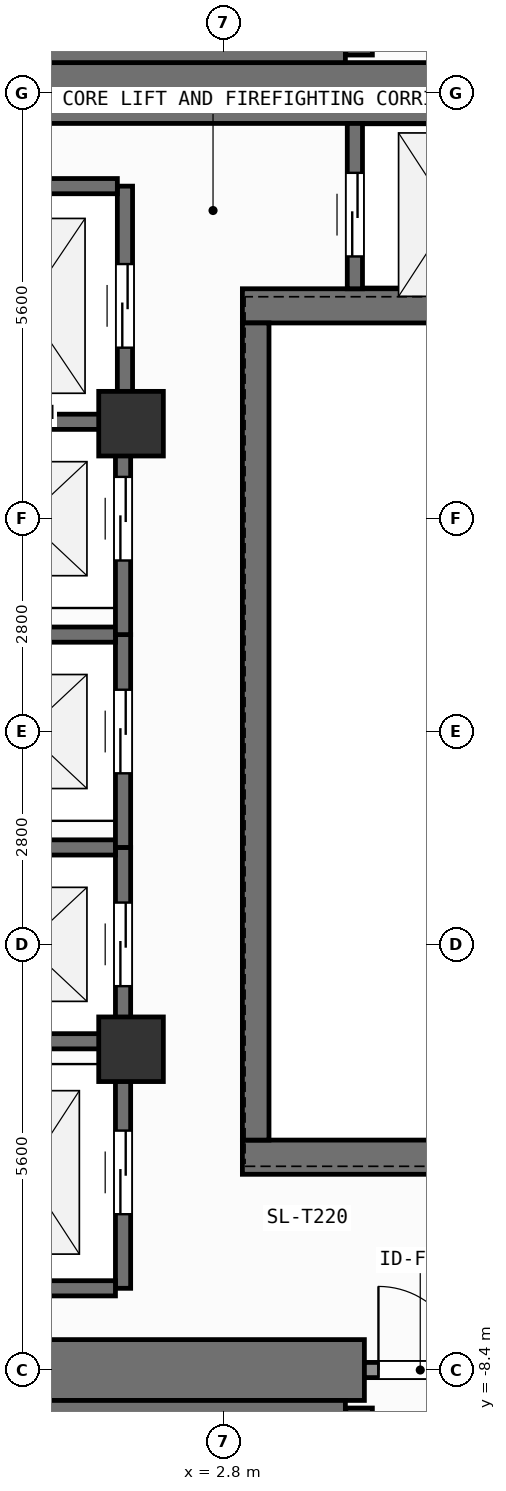
"""IFC4 building model, lengths in metres.
Left out: names, types, materials, properties, quantities, classifications, styles, units other than length and angle.
Written with IfcOpenShell. Run it as: python <this file> out.ifc"""

import sys

from ifc_helpers import new_model, si_unit, direction, frame, frame_2d, origin, origin_2d, place, context, subcontext, project, spatial, rectangle, extrude, element, fill, save


model = new_model("IFC4")
c1 = context("Model", 3, precision=1e-05, world=origin(), true_north=direction((0.0, 1.0)))
c2 = subcontext(c1, "Body", "Model", "MODEL_VIEW")
j1 = project(units=[si_unit("LENGTHUNIT", "METRE"), si_unit("PLANEANGLEUNIT", "RADIAN")], contexts=[c1])
p1 = place(None, origin())
s1 = spatial("IfcSite", under=j1, at=p1, CompositionType="ELEMENT")
p2 = place(p1, origin())
s2 = spatial("IfcBuilding", under=s1, at=p2, CompositionType="ELEMENT")
p3 = place(p2, frame((0.0, 0.0, 227.4)))
s3 = spatial("IfcBuildingStorey", under=s2, at=p3, CompositionType="ELEMENT", Elevation=227.4)
p4 = place(p3, frame((-2.62, -8.4, 0.0), z_axis=(0.0, 0.0, 1.0), x_axis=(1.0, 0.0, 0.0)))
e1 = element("IfcWall", 1, at=p4, inside=s3, PredefinedType="SHEAR", context=c2, shape_type="SweptSolid", body=[
    extrude(rectangle(XDim=7.27, YDim=0.8, at=frame_2d((3.635, 0.0))), origin(), (0.0, 0.0, 1.0), 3.9),
])
p5 = place(p3, frame((-7.55, 8.4, 0.0), z_axis=(0.0, 0.0, 1.0), x_axis=(1.0, 0.0, 0.0)))
e2 = element("IfcWall", 2, at=p5, inside=s3, PredefinedType="SHEAR", context=c2, shape_type="SweptSolid", body=[
    extrude(rectangle(XDim=16.35, YDim=0.8, at=frame_2d((8.175, 0.0))), origin(), (0.0, 0.0, 1.0), 3.9),
])
for number, where, z_axis, x_axis in (
    (3, (3.045, -5.6, 0.0), (0.0, 0.0, 1.0), (1.0, 0.0, 0.0)),
    (4, (3.045, 5.6, 0.0), (0.0, 0.0, 1.0), (1.0, 0.0, 0.0)),
):
    element("IfcWall", number, at=place(p3, frame(where, z_axis=z_axis, x_axis=x_axis)), inside=s3, PredefinedType="SHEAR", context=c2, shape_type="SweptSolid", body=[
        extrude(rectangle(XDim=5.755, YDim=0.45, at=frame_2d((2.877, 0.0))), origin(), (0.0, 0.0, 1.0), 3.9),
    ])
p6 = place(p3, frame((3.22, -5.375, 0.0), z_axis=(0.0, 0.0, 1.0), x_axis=(0.0, 1.0, 0.0)))
e5 = element("IfcWall", 5, at=p6, inside=s3, PredefinedType="SHEAR", context=c2, shape_type="SweptSolid", body=[
    extrude(rectangle(XDim=10.75, YDim=0.35, at=frame_2d((5.375, 0.0))), origin(), (0.0, 0.0, 1.0), 3.9),
])
p7 = place(p3, frame((-2.2, -8.913, 0.0), z_axis=(0.0, 0.0, 1.0), x_axis=(1.0, 0.0, 0.0)))
e6 = element("IfcWall", 6, at=p7, inside=s3, PredefinedType="SHEAR", context=c2, shape_type="SweptSolid", body=[
    extrude(rectangle(XDim=6.6, YDim=0.225, at=frame_2d((3.3, 0.0))), origin(), (0.0, 0.0, 1.0), 3.9),
])
p8 = place(p3, frame((4.58, -8.9, 0.0), z_axis=(0.0, 0.0, 1.0), x_axis=(0.0, -1.0, 0.0)))
e7 = element("IfcWall", 7, at=p8, inside=s3, PredefinedType="SHEAR", context=c2, shape_type="SweptSolid", body=[
    extrude(rectangle(XDim=2.925, YDim=0.35, at=frame_2d((1.462, 0.0))), origin(), (0.0, 0.0, 1.0), 3.9),
])
p9 = place(p8, frame((0.913, 0.0, 0.0)))
e8 = element("IfcOpeningElement", 8, at=p9, cuts=e7, PredefinedType="OPENING", context=c2, shape_type="SweptSolid", body=[
    extrude(rectangle(XDim=1.1, YDim=2.15, at=frame_2d((0.55, 1.075))), frame((0.0, 0.185, 0.0), z_axis=(0.0, -1.0, 0.0), x_axis=(1.0, 0.0, 0.0)), (0.0, 0.0, 1.0), 0.37),
])
p10 = place(p3, frame((-2.2, 8.913, 0.0), z_axis=(0.0, 0.0, 1.0), x_axis=(1.0, 0.0, 0.0)))
e9 = element("IfcWall", 9, at=p10, inside=s3, PredefinedType="SHEAR", context=c2, shape_type="SweptSolid", body=[
    extrude(rectangle(XDim=6.6, YDim=0.225, at=frame_2d((3.3, 0.0))), origin(), (0.0, 0.0, 1.0), 3.9),
])
p11 = place(p3, frame((4.58, 11.825, 0.0), z_axis=(0.0, 0.0, 1.0), x_axis=(0.0, -1.0, 0.0)))
e10 = element("IfcWall", 10, at=p11, inside=s3, PredefinedType="SHEAR", context=c2, shape_type="SweptSolid", body=[
    extrude(rectangle(XDim=2.925, YDim=0.35, at=frame_2d((1.462, 0.0))), origin(), (0.0, 0.0, 1.0), 3.9),
])
p12 = place(p11, frame((0.913, 0.0, 0.0)))
e11 = element("IfcOpeningElement", 11, at=p12, cuts=e10, PredefinedType="OPENING", context=c2, shape_type="SweptSolid", body=[
    extrude(rectangle(XDim=1.1, YDim=2.15, at=frame_2d((0.55, 1.075))), frame((0.0, 0.185, 0.0), z_axis=(0.0, -1.0, 0.0), x_axis=(1.0, 0.0, 0.0)), (0.0, 0.0, 1.0), 0.37),
])
for number, where, z_axis, x_axis in (
    (12, (1.58, -4.18, 0.0), (0.0, 0.0, 1.0), (1.0, 0.0, 0.0)),
    (13, (1.58, 4.05, 0.0), (0.0, 0.0, 1.0), (1.0, 0.0, 0.0)),
):
    element("IfcColumn", number, at=place(p3, frame(where, z_axis=z_axis, x_axis=x_axis)), inside=s3, PredefinedType="COLUMN", context=c2, shape_type="SweptSolid", body=[
        extrude(rectangle(XDim=0.85, YDim=0.85, at=origin_2d()), origin(), (0.0, 0.0, 1.0), 3.9),
    ])
p13 = place(p3, frame((1.475, -4.275, 0.0), z_axis=(0.0, 0.0, 1.0), x_axis=(0.0, 1.0, 0.0)))
e14 = element("IfcWall", 14, at=p13, inside=s3, PredefinedType="SHEAR", context=c2, shape_type="SweptSolid", body=[
    extrude(rectangle(XDim=2.75, YDim=0.2, at=frame_2d((1.375, 0.0))), origin(), (0.0, 0.0, 1.0), 3.68),
])
p14 = place(p13, frame((0.925, 0.0, 0.0)))
e15 = element("IfcOpeningElement", 15, at=p14, cuts=e14, PredefinedType="OPENING", context=c2, shape_type="SweptSolid", body=[
    extrude(rectangle(XDim=1.1, YDim=2.2, at=frame_2d((0.55, 1.1))), frame((0.0, 0.11, 0.0), z_axis=(0.0, -1.0, 0.0), x_axis=(1.0, 0.0, 0.0)), (0.0, 0.0, 1.0), 0.22),
])
for number, where, z_axis, x_axis in (
    (16, (-0.975, -4.075, 0.0), (0.0, 0.0, 1.0), (1.0, 0.0, 0.0)),
    (17, (-0.975, -1.525, 0.0), (0.0, 0.0, 1.0), (1.0, 0.0, 0.0)),
):
    element("IfcWall", number, at=place(p3, frame(where, z_axis=z_axis, x_axis=x_axis)), inside=s3, PredefinedType="SHEAR", context=c2, shape_type="SweptSolid", body=[
        extrude(rectangle(XDim=2.35, YDim=0.2, at=frame_2d((1.175, 0.0))), origin(), (0.0, 0.0, 1.0), 3.68),
    ])
p15 = place(p3, frame((1.475, -1.525, 0.0), z_axis=(0.0, 0.0, 1.0), x_axis=(0.0, 1.0, 0.0)))
e18 = element("IfcWall", 18, at=p15, inside=s3, PredefinedType="SHEAR", context=c2, shape_type="SweptSolid", body=[
    extrude(rectangle(XDim=2.8, YDim=0.2, at=frame_2d((1.4, 0.0))), origin(), (0.0, 0.0, 1.0), 3.68),
])
p16 = place(p15, frame((0.975, 0.0, 0.0)))
e19 = element("IfcOpeningElement", 19, at=p16, cuts=e18, PredefinedType="OPENING", context=c2, shape_type="SweptSolid", body=[
    extrude(rectangle(XDim=1.1, YDim=2.2, at=frame_2d((0.55, 1.1))), frame((0.0, 0.11, 0.0), z_axis=(0.0, -1.0, 0.0), x_axis=(1.0, 0.0, 0.0)), (0.0, 0.0, 1.0), 0.22),
])
p17 = place(p3, frame((-0.975, 1.275, 0.0), z_axis=(0.0, 0.0, 1.0), x_axis=(1.0, 0.0, 0.0)))
e20 = element("IfcWall", 20, at=p17, inside=s3, PredefinedType="SHEAR", context=c2, shape_type="SweptSolid", body=[
    extrude(rectangle(XDim=2.35, YDim=0.2, at=frame_2d((1.175, 0.0))), origin(), (0.0, 0.0, 1.0), 3.68),
])
p18 = place(p3, frame((1.475, 1.275, 0.0), z_axis=(0.0, 0.0, 1.0), x_axis=(0.0, 1.0, 0.0)))
e21 = element("IfcWall", 21, at=p18, inside=s3, PredefinedType="SHEAR", context=c2, shape_type="SweptSolid", body=[
    extrude(rectangle(XDim=2.8, YDim=0.2, at=frame_2d((1.4, 0.0))), origin(), (0.0, 0.0, 1.0), 3.68),
])
p19 = place(p18, frame((0.975, 0.0, 0.0)))
e22 = element("IfcOpeningElement", 22, at=p19, cuts=e21, PredefinedType="OPENING", context=c2, shape_type="SweptSolid", body=[
    extrude(rectangle(XDim=1.1, YDim=2.2, at=frame_2d((0.55, 1.1))), frame((0.0, 0.11, 0.0), z_axis=(0.0, -1.0, 0.0), x_axis=(1.0, 0.0, 0.0)), (0.0, 0.0, 1.0), 0.22),
])
p20 = place(p3, frame((-0.975, 4.075, 0.0), z_axis=(0.0, 0.0, 1.0), x_axis=(1.0, 0.0, 0.0)))
e23 = element("IfcWall", 23, at=p20, inside=s3, PredefinedType="SHEAR", context=c2, shape_type="SweptSolid", body=[
    extrude(rectangle(XDim=2.35, YDim=0.2, at=frame_2d((1.175, 0.0))), origin(), (0.0, 0.0, 1.0), 3.68),
])
p21 = place(p3, frame((1.5, 4.025, 0.0), z_axis=(0.0, 0.0, 1.0), x_axis=(0.0, 1.0, 0.0)))
e24 = element("IfcWall", 24, at=p21, inside=s3, PredefinedType="SHEAR", context=c2, shape_type="SweptSolid", body=[
    extrude(rectangle(XDim=3.15, YDim=0.2, at=frame_2d((1.575, 0.0))), origin(), (0.0, 0.0, 1.0), 3.68),
])
p22 = place(p21, frame((1.025, 0.0, 0.0)))
e25 = element("IfcOpeningElement", 25, at=p22, cuts=e24, PredefinedType="OPENING", context=c2, shape_type="SweptSolid", body=[
    extrude(rectangle(XDim=1.1, YDim=2.2, at=frame_2d((0.55, 1.1))), frame((0.0, 0.11, 0.0), z_axis=(0.0, -1.0, 0.0), x_axis=(1.0, 0.0, 0.0)), (0.0, 0.0, 1.0), 0.22),
])
p23 = place(p3, frame((-1.0, 7.175, 0.0), z_axis=(0.0, 0.0, 1.0), x_axis=(1.0, 0.0, 0.0)))
e26 = element("IfcWall", 26, at=p23, inside=s3, PredefinedType="SHEAR", context=c2, shape_type="SweptSolid", body=[
    extrude(rectangle(XDim=2.4, YDim=0.2, at=frame_2d((1.2, 0.0))), origin(), (0.0, 0.0, 1.0), 3.68),
])
p24 = place(p3, frame((1.475, -7.325, 0.0), z_axis=(0.0, 0.0, 1.0), x_axis=(0.0, 1.0, 0.0)))
e27 = element("IfcWall", 27, at=p24, inside=s3, PredefinedType="SHEAR", context=c2, shape_type="SweptSolid", body=[
    extrude(rectangle(XDim=3.05, YDim=0.2, at=frame_2d((1.525, 0.0))), origin(), (0.0, 0.0, 1.0), 3.68),
])
p25 = place(p24, frame((0.975, 0.0, 0.0)))
e28 = element("IfcOpeningElement", 28, at=p25, cuts=e27, PredefinedType="OPENING", context=c2, shape_type="SweptSolid", body=[
    extrude(rectangle(XDim=1.1, YDim=2.2, at=frame_2d((0.55, 1.1))), frame((0.0, 0.11, 0.0), z_axis=(0.0, -1.0, 0.0), x_axis=(1.0, 0.0, 0.0)), (0.0, 0.0, 1.0), 0.22),
])
p26 = place(p3, frame((-0.975, -7.325, 0.0), z_axis=(0.0, 0.0, 1.0), x_axis=(1.0, 0.0, 0.0)))
e29 = element("IfcWall", 29, at=p26, inside=s3, PredefinedType="SHEAR", context=c2, shape_type="SweptSolid", body=[
    extrude(rectangle(XDim=2.35, YDim=0.2, at=frame_2d((1.175, 0.0))), origin(), (0.0, 0.0, 1.0), 3.68),
])
p27 = place(p3, frame((4.525, 5.825, 0.0), z_axis=(0.0, 0.0, 1.0), x_axis=(0.0, 1.0, 0.0)))
e30 = element("IfcWall", 30, at=p27, inside=s3, PredefinedType="SHEAR", context=c2, shape_type="SweptSolid", body=[
    extrude(rectangle(XDim=2.175, YDim=0.2, at=frame_2d((1.087, 0.0))), origin(), (0.0, 0.0, 1.0), 3.68),
])
p28 = place(p27, frame((0.425, 0.0, 0.0)))
e31 = element("IfcOpeningElement", 31, at=p28, cuts=e30, PredefinedType="OPENING", context=c2, shape_type="SweptSolid", body=[
    extrude(rectangle(XDim=1.1, YDim=2.2, at=frame_2d((0.55, 1.1))), frame((0.0, 0.11, 0.0), z_axis=(0.0, -1.0, 0.0), x_axis=(1.0, 0.0, 0.0)), (0.0, 0.0, 1.0), 0.22),
])
p29 = place(p3, frame((4.65, -8.4, 0.0), z_axis=(0.0, 0.0, 1.0), x_axis=(1.0, 0.0, 0.0)))
e32 = element("IfcWall", 32, at=p29, inside=s3, PredefinedType="SOLIDWALL", context=c2, shape_type="SweptSolid", body=[
    extrude(rectangle(XDim=1.47, YDim=0.2, at=frame_2d((0.735, 0.0))), origin(), (0.0, 0.0, 1.0), 2.82),
])
p30 = place(p29, frame((0.185, 0.0, 0.0)))
e33 = element("IfcOpeningElement", 33, at=p30, cuts=e32, PredefinedType="OPENING", context=c2, shape_type="SweptSolid", body=[
    extrude(rectangle(XDim=1.1, YDim=2.15, at=frame_2d((0.55, 1.075))), frame((0.0, 0.11, 0.0), z_axis=(0.0, -1.0, 0.0), x_axis=(1.0, 0.0, 0.0)), (0.0, 0.0, 1.0), 0.22),
])
p31 = place(p14, origin())
e34 = element("IfcDoor", 34, at=p31, inside=s3, OperationType="SLIDING_TO_LEFT", PredefinedType="DOOR", context=c2, shape_type="SweptSolid", body=[
    extrude(rectangle(XDim=1.1, YDim=2.2, at=frame_2d((0.55, 1.1))), frame((0.0, 0.025, 0.0), z_axis=(0.0, -1.0, 0.0), x_axis=(1.0, 0.0, 0.0)), (0.0, 0.0, 1.0), 0.05),
])
fill(e15, e34)
p32 = place(p16, origin())
e35 = element("IfcDoor", 35, at=p32, inside=s3, OperationType="SLIDING_TO_LEFT", PredefinedType="DOOR", context=c2, shape_type="SweptSolid", body=[
    extrude(rectangle(XDim=1.1, YDim=2.2, at=frame_2d((0.55, 1.1))), frame((0.0, 0.025, 0.0), z_axis=(0.0, -1.0, 0.0), x_axis=(1.0, 0.0, 0.0)), (0.0, 0.0, 1.0), 0.05),
])
fill(e19, e35)
p33 = place(p19, origin())
e36 = element("IfcDoor", 36, at=p33, inside=s3, OperationType="SLIDING_TO_LEFT", PredefinedType="DOOR", context=c2, shape_type="SweptSolid", body=[
    extrude(rectangle(XDim=1.1, YDim=2.2, at=frame_2d((0.55, 1.1))), frame((0.0, 0.025, 0.0), z_axis=(0.0, -1.0, 0.0), x_axis=(1.0, 0.0, 0.0)), (0.0, 0.0, 1.0), 0.05),
])
fill(e22, e36)
p34 = place(p22, origin())
e37 = element("IfcDoor", 37, at=p34, inside=s3, OperationType="SLIDING_TO_LEFT", PredefinedType="DOOR", context=c2, shape_type="SweptSolid", body=[
    extrude(rectangle(XDim=1.1, YDim=2.2, at=frame_2d((0.55, 1.1))), frame((0.0, 0.025, 0.0), z_axis=(0.0, -1.0, 0.0), x_axis=(1.0, 0.0, 0.0)), (0.0, 0.0, 1.0), 0.05),
])
fill(e25, e37)
p35 = place(p25, origin())
e38 = element("IfcDoor", 38, at=p35, inside=s3, OperationType="SLIDING_TO_LEFT", PredefinedType="DOOR", context=c2, shape_type="SweptSolid", body=[
    extrude(rectangle(XDim=1.1, YDim=2.2, at=frame_2d((0.55, 1.1))), frame((0.0, 0.025, 0.0), z_axis=(0.0, -1.0, 0.0), x_axis=(1.0, 0.0, 0.0)), (0.0, 0.0, 1.0), 0.05),
])
fill(e28, e38)
p36 = place(p28, origin())
e39 = element("IfcDoor", 39, at=p36, inside=s3, OperationType="SLIDING_TO_LEFT", PredefinedType="DOOR", context=c2, shape_type="SweptSolid", body=[
    extrude(rectangle(XDim=1.1, YDim=2.2, at=frame_2d((0.55, 1.1))), frame((0.0, 0.025, 0.0), z_axis=(0.0, -1.0, 0.0), x_axis=(1.0, 0.0, 0.0)), (0.0, 0.0, 1.0), 0.05),
])
fill(e31, e39)
p37 = place(p30, origin())
e40 = element("IfcDoor", 40, at=p37, inside=s3, OperationType="SINGLE_SWING_LEFT", PredefinedType="DOOR", context=c2, shape_type="SweptSolid", body=[
    extrude(rectangle(XDim=1.1, YDim=2.15, at=frame_2d((0.55, 1.075))), frame((0.0, 0.025, 0.0), z_axis=(0.0, -1.0, 0.0), x_axis=(1.0, 0.0, 0.0)), (0.0, 0.0, 1.0), 0.05),
])
fill(e33, e40)
save(model, sys.argv[1])
